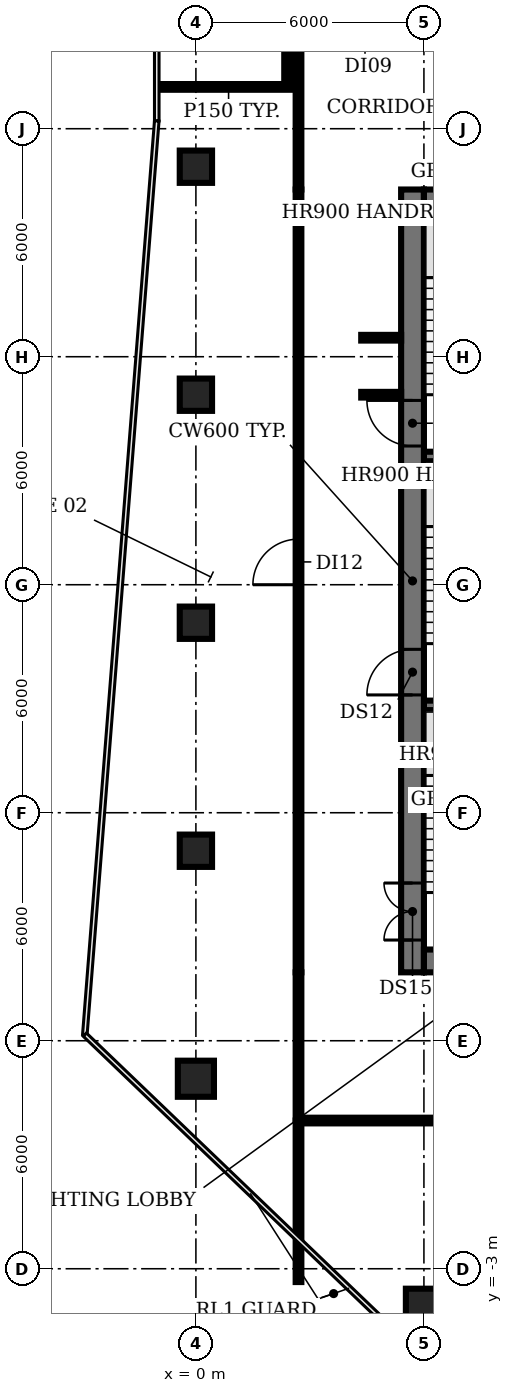
"""IFC4 building model, lengths in metres.
Left out: names, types, materials, properties, quantities, classifications, styles, units other than length and angle.
Written with IfcOpenShell. Run it as: python <this file> out.ifc"""

import sys

from ifc_helpers import new_model, si_unit, direction, frame, frame_2d, origin, origin_2d, place, context, subcontext, project, spatial, rectangle, circle, extrude, element, fill, save


model = new_model("IFC4")
c1 = context("Model", 3, precision=1e-05, world=origin(), true_north=direction((0.0, 1.0)))
c2 = subcontext(c1, "Body", "Model", "MODEL_VIEW")
j1 = project(units=[si_unit("LENGTHUNIT", "METRE"), si_unit("PLANEANGLEUNIT", "RADIAN")], contexts=[c1])
p1 = place(None, origin())
s1 = spatial("IfcSite", under=j1, at=p1, CompositionType="ELEMENT")
p2 = place(p1, origin())
s2 = spatial("IfcBuilding", under=s1, at=p2, CompositionType="ELEMENT")
p3 = place(p2, frame((0.0, 0.0, 150.8)))
s3 = spatial("IfcBuildingStorey", under=s2, at=p3, CompositionType="ELEMENT", Elevation=150.8)
p4 = place(p3, frame((0.0, 2.0, 0.0), z_axis=(0.0, 0.0, 1.0), x_axis=(1.0, 0.0, 0.0)))
e1 = element("IfcColumn", 1, at=p4, inside=s3, PredefinedType="COLUMN", context=c2, shape_type="SweptSolid", body=[
    extrude(circle(Radius=0.475, at=origin_2d()), origin(), (0.0, 0.0, 1.0), 3.85),
])
for number, where, z_axis, x_axis in (
    (2, (0.0, 8.0, 0.0), (0.0, 0.0, 1.0), (1.0, 0.0, 0.0)),
    (3, (0.0, 14.0, 0.0), (0.0, 0.0, 1.0), (1.0, 0.0, 0.0)),
    (4, (0.0, 20.0, 0.0), (0.0, 0.0, 1.0), (1.0, 0.0, 0.0)),
    (5, (0.0, 26.0, 0.0), (0.0, 0.0, 1.0), (1.0, 0.0, 0.0)),
):
    element("IfcColumn", number, at=place(p3, frame(where, z_axis=z_axis, x_axis=x_axis)), inside=s3, PredefinedType="COLUMN", context=c2, shape_type="SweptSolid", body=[
        extrude(rectangle(XDim=0.85, YDim=0.85, at=origin_2d()), origin(), (0.0, 0.0, 1.0), 3.85),
    ])
p5 = place(p3, frame((6.0, -4.0, 0.0), z_axis=(0.0, 0.0, 1.0), x_axis=(1.0, 0.0, 0.0)))
e6 = element("IfcColumn", 6, at=p5, inside=s3, PredefinedType="COLUMN", context=c2, shape_type="SweptSolid", body=[
    extrude(circle(Radius=0.475, at=origin_2d()), origin(), (0.0, 0.0, 1.0), 3.85),
])
for number, where, z_axis, x_axis in (
    (7, (6.0, 11.825, 0.0), (0.0, 0.0, 1.0), (1.0, 0.0, 0.0)),
    (8, (6.0, 18.375, 0.0), (0.0, 0.0, 1.0), (1.0, 0.0, 0.0)),
):
    element("IfcWall", number, at=place(p3, frame(where, z_axis=z_axis, x_axis=x_axis)), inside=s3, PredefinedType="SHEAR", context=c2, shape_type="SweptSolid", body=[
        extrude(rectangle(XDim=3.15, YDim=0.25, at=frame_2d((1.575, 0.0))), origin(), (0.0, 0.0, 1.0), 3.85),
    ])
p6 = place(p3, frame((5.7, 4.8, 0.0), z_axis=(0.0, 0.0, 1.0), x_axis=(0.0, 1.0, 0.0)))
e9 = element("IfcWall", 9, at=p6, inside=s3, PredefinedType="SHEAR", context=c2, shape_type="SweptSolid", body=[
    extrude(rectangle(XDim=20.6, YDim=0.6, at=frame_2d((10.3, 0.0))), origin(), (0.0, 0.0, 1.0), 3.85),
])
p7 = place(p6, frame((0.85, 0.0, 0.0)))
e10 = element("IfcOpeningElement", 10, at=p7, cuts=e9, PredefinedType="OPENING", context=c2, shape_type="SweptSolid", body=[
    extrude(rectangle(XDim=1.5, YDim=2.1, at=frame_2d((0.75, 1.05))), frame((0.0, 0.31, 0.0), z_axis=(0.0, -1.0, 0.0), x_axis=(1.0, 0.0, 0.0)), (0.0, 0.0, 1.0), 0.62),
])
p8 = place(p6, frame((7.3, 0.0, 0.0)))
e11 = element("IfcOpeningElement", 11, at=p8, cuts=e9, PredefinedType="OPENING", context=c2, shape_type="SweptSolid", body=[
    extrude(rectangle(XDim=1.2, YDim=2.1, at=frame_2d((0.6, 1.05))), frame((0.0, 0.31, 0.0), z_axis=(0.0, -1.0, 0.0), x_axis=(1.0, 0.0, 0.0)), (0.0, 0.0, 1.0), 0.62),
])
p9 = place(p6, frame((13.85, 0.0, 0.0)))
e12 = element("IfcOpeningElement", 12, at=p9, cuts=e9, PredefinedType="OPENING", context=c2, shape_type="SweptSolid", body=[
    extrude(rectangle(XDim=1.2, YDim=2.1, at=frame_2d((0.6, 1.05))), frame((0.0, 0.31, 0.0), z_axis=(0.0, -1.0, 0.0), x_axis=(1.0, 0.0, 0.0)), (0.0, 0.0, 1.0), 0.62),
])
p10 = place(p3, frame((24.0, 5.1, 0.0), z_axis=(0.0, 0.0, 1.0), x_axis=(-1.0, 0.0, 0.0)))
e13 = element("IfcWall", 13, at=p10, inside=s3, PredefinedType="SHEAR", context=c2, shape_type="SweptSolid", body=[
    extrude(rectangle(XDim=18.0, YDim=0.6, at=frame_2d((9.0, 0.0))), origin(), (0.0, 0.0, 1.0), 3.85),
])
p11 = place(p10, frame((13.0, 0.0, 0.0)))
e14 = element("IfcOpeningElement", 14, at=p11, cuts=e13, PredefinedType="OPENING", context=c2, shape_type="SweptSolid", body=[
    extrude(rectangle(XDim=1.2, YDim=2.1, at=frame_2d((0.6, 1.05))), frame((0.0, 0.31, 0.0), z_axis=(0.0, -1.0, 0.0), x_axis=(1.0, 0.0, 0.0)), (0.0, 0.0, 1.0), 0.62),
])
p12 = place(p10, frame((4.9, 0.0, 0.0)))
e15 = element("IfcOpeningElement", 15, at=p12, cuts=e13, PredefinedType="OPENING", context=c2, shape_type="SweptSolid", body=[
    extrude(rectangle(XDim=1.0, YDim=2.1, at=frame_2d((0.5, 1.05))), frame((0.0, 0.31, 0.0), z_axis=(0.0, -1.0, 0.0), x_axis=(1.0, 0.0, 0.0)), (0.0, 0.0, 1.0), 0.62),
])
p13 = place(p3, frame((6.0, 25.1, 0.0), z_axis=(0.0, 0.0, 1.0), x_axis=(1.0, 0.0, 0.0)))
e16 = element("IfcWall", 16, at=p13, inside=s3, PredefinedType="SHEAR", context=c2, shape_type="SweptSolid", body=[
    extrude(rectangle(XDim=18.0, YDim=0.6, at=frame_2d((9.0, 0.0))), origin(), (0.0, 0.0, 1.0), 3.85),
])
p14 = place(p3, frame((-0.98, 28.1, 0.0), z_axis=(0.0, 0.0, 1.0), x_axis=(1.0, 0.0, 0.0)))
e17 = element("IfcWall", 17, at=p14, inside=s3, PredefinedType="PARTITIONING", context=c2, shape_type="SweptSolid", body=[
    extrude(rectangle(XDim=3.68, YDim=0.15, at=frame_2d((1.84, 0.0))), origin(), (0.0, 0.0, 1.0), 2.88),
])
p15 = place(p3, frame((2.4, 28.1, 0.0), z_axis=(0.0, 0.0, 1.0), x_axis=(0.0, 1.0, 0.0)))
e18 = element("IfcWall", 18, at=p15, inside=s3, PredefinedType="PARTITIONING", context=c2, shape_type="SweptSolid", body=[
    extrude(rectangle(XDim=6.0, YDim=0.15, at=frame_2d((3.0, 0.0))), origin(), (0.0, 0.0, 1.0), 2.88),
])
p16 = place(p3, frame((2.7, -3.35, 0.0), z_axis=(0.0, 0.0, 1.0), x_axis=(0.0, 1.0, 0.0)))
e19 = element("IfcWall", 19, at=p16, inside=s3, PredefinedType="PARTITIONING", context=c2, shape_type="SweptSolid", body=[
    extrude(rectangle(XDim=4.25, YDim=0.15, at=frame_2d((2.125, 0.0))), origin(), (0.0, 0.0, 1.0), 2.88),
])
p17 = place(p3, frame((2.7, 0.9, 0.0), z_axis=(0.0, 0.0, 1.0), x_axis=(0.0, 1.0, 0.0)))
e20 = element("IfcWall", 20, at=p17, inside=s3, PredefinedType="PARTITIONING", context=c2, shape_type="SweptSolid", body=[
    extrude(rectangle(XDim=3.9, YDim=0.15, at=frame_2d((1.95, 0.0))), origin(), (0.0, 0.0, 1.0), 2.88),
])
p18 = place(p3, frame((2.7, 4.8, 0.0), z_axis=(0.0, 0.0, 1.0), x_axis=(0.0, 1.0, 0.0)))
e21 = element("IfcWall", 21, at=p18, inside=s3, PredefinedType="PARTITIONING", context=c2, shape_type="SweptSolid", body=[
    extrude(rectangle(XDim=20.6, YDim=0.15, at=frame_2d((10.3, 0.0))), origin(), (0.0, 0.0, 1.0), 2.88),
])
p19 = place(p18, frame((10.2, 0.0, 0.0)))
e22 = element("IfcOpeningElement", 22, at=p19, cuts=e21, PredefinedType="OPENING", context=c2, shape_type="SweptSolid", body=[
    extrude(rectangle(XDim=1.2, YDim=2.1, at=frame_2d((0.6, 1.05))), frame((0.0, 0.085, 0.0), z_axis=(0.0, -1.0, 0.0), x_axis=(1.0, 0.0, 0.0)), (0.0, 0.0, 1.0), 0.17),
])
p20 = place(p3, frame((2.7, 25.4, 0.0), z_axis=(0.0, 0.0, 1.0), x_axis=(0.0, 1.0, 0.0)))
e23 = element("IfcWall", 23, at=p20, inside=s3, PredefinedType="PARTITIONING", context=c2, shape_type="SweptSolid", body=[
    extrude(rectangle(XDim=3.9, YDim=0.15, at=frame_2d((1.95, 0.0))), origin(), (0.0, 0.0, 1.0), 2.88),
])
for number, where, z_axis, x_axis in (
    (24, (4.35, 20.0, 0.0), (0.0, 0.0, 1.0), (1.0, 0.0, 0.0)),
    (25, (4.35, 21.5, 0.0), (0.0, 0.0, 1.0), (1.0, 0.0, 0.0)),
):
    element("IfcWall", number, at=place(p3, frame(where, z_axis=z_axis, x_axis=x_axis)), inside=s3, PredefinedType="PARTITIONING", context=c2, shape_type="SweptSolid", body=[
        extrude(rectangle(XDim=1.05, YDim=0.15, at=frame_2d((0.525, 0.0))), origin(), (0.0, 0.0, 1.0), 2.88),
    ])
p21 = place(p3, frame((27.3, 0.9, 0.0), z_axis=(0.0, 0.0, 1.0), x_axis=(-1.0, 0.0, 0.0)))
e26 = element("IfcWall", 26, at=p21, inside=s3, PredefinedType="PARTITIONING", context=c2, shape_type="SweptSolid", body=[
    extrude(rectangle(XDim=24.6, YDim=0.15, at=frame_2d((12.3, 0.0))), origin(), (0.0, 0.0, 1.0), 2.88),
])
p22 = place(p21, frame((11.8, 0.0, 0.0)))
e27 = element("IfcOpeningElement", 27, at=p22, cuts=e26, PredefinedType="OPENING", context=c2, shape_type="SweptSolid", body=[
    extrude(rectangle(XDim=1.2, YDim=2.1, at=frame_2d((0.6, 1.05))), frame((0.0, 0.085, 0.0), z_axis=(0.0, -1.0, 0.0), x_axis=(1.0, 0.0, 0.0)), (0.0, 0.0, 1.0), 0.17),
])
p23 = place(p7, origin())
e28 = element("IfcDoor", 28, at=p23, inside=s3, OperationType="DOUBLE_DOOR_SINGLE_SWING", PredefinedType="DOOR", context=c2, shape_type="SweptSolid", body=[
    extrude(rectangle(XDim=1.5, YDim=2.1, at=frame_2d((0.75, 1.05))), frame((0.0, 0.025, 0.0), z_axis=(0.0, -1.0, 0.0), x_axis=(1.0, 0.0, 0.0)), (0.0, 0.0, 1.0), 0.05),
])
fill(e10, e28)
p24 = place(p8, origin())
e29 = element("IfcDoor", 29, at=p24, inside=s3, OperationType="SINGLE_SWING_LEFT", PredefinedType="DOOR", context=c2, shape_type="SweptSolid", body=[
    extrude(rectangle(XDim=1.2, YDim=2.1, at=frame_2d((0.6, 1.05))), frame((0.0, 0.025, 0.0), z_axis=(0.0, -1.0, 0.0), x_axis=(1.0, 0.0, 0.0)), (0.0, 0.0, 1.0), 0.05),
])
fill(e11, e29)
p25 = place(p9, origin())
e30 = element("IfcDoor", 30, at=p25, inside=s3, OperationType="SINGLE_SWING_RIGHT", PredefinedType="DOOR", context=c2, shape_type="SweptSolid", body=[
    extrude(rectangle(XDim=1.2, YDim=2.1, at=frame_2d((0.6, 1.05))), frame((0.0, 0.025, 0.0), z_axis=(0.0, -1.0, 0.0), x_axis=(1.0, 0.0, 0.0)), (0.0, 0.0, 1.0), 0.05),
])
fill(e12, e30)
p26 = place(p19, origin())
e31 = element("IfcDoor", 31, at=p26, inside=s3, OperationType="SINGLE_SWING_LEFT", PredefinedType="DOOR", context=c2, shape_type="SweptSolid", body=[
    extrude(rectangle(XDim=1.2, YDim=2.1, at=frame_2d((0.6, 1.05))), frame((0.0, 0.025, 0.0), z_axis=(0.0, -1.0, 0.0), x_axis=(1.0, 0.0, 0.0)), (0.0, 0.0, 1.0), 0.05),
])
fill(e22, e31)
save(model, sys.argv[1])
